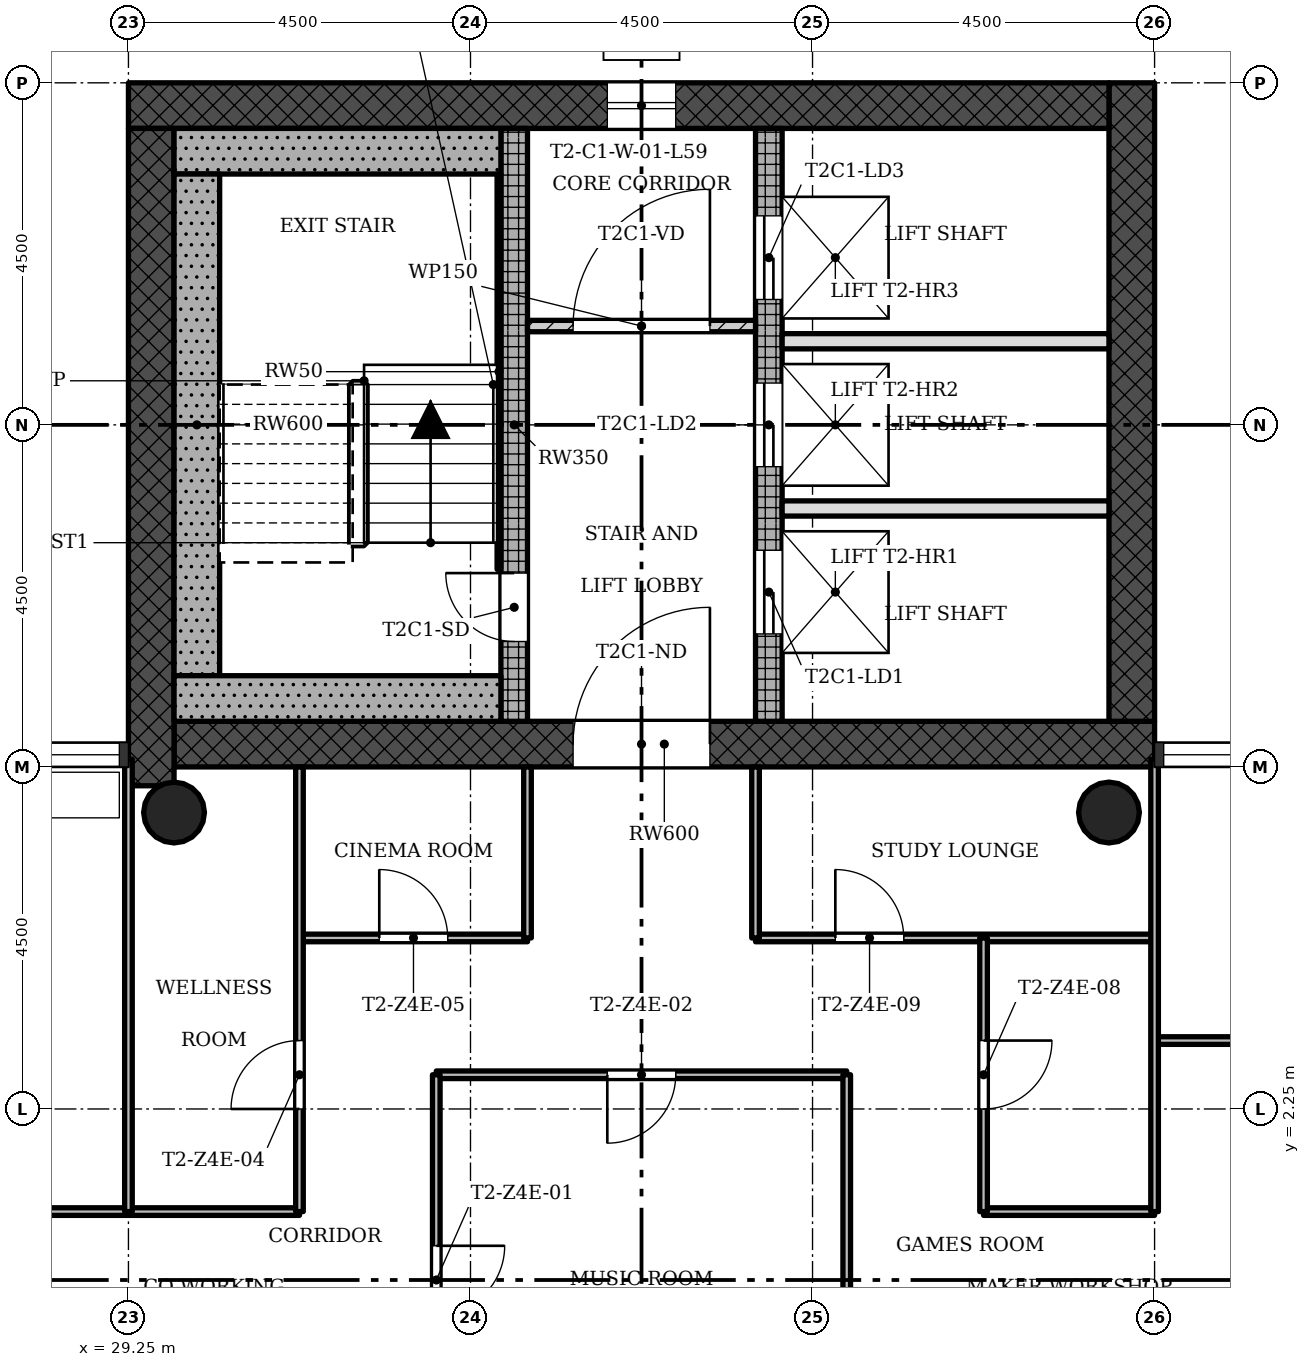
"""IFC4 building model, lengths in metres.
Left out: names, types, materials, properties, quantities, classifications, styles, units other than length and angle.
Written with IfcOpenShell. Run it as: python <this file> out.ifc"""

import sys

from ifc_helpers import new_model, si_unit, direction, frame, frame_2d, origin, origin_2d, place, context, subcontext, project, spatial, rectangle, hollow_circle, extrude, element, fill, save


model = new_model("IFC4")
c1 = context("Model", 3, precision=1e-05, world=origin(), true_north=direction((0.0, 1.0)))
c2 = subcontext(c1, "Body", "Model", "MODEL_VIEW")
j1 = project(units=[si_unit("LENGTHUNIT", "METRE"), si_unit("PLANEANGLEUNIT", "RADIAN")], contexts=[c1])
p1 = place(None, origin())
s1 = spatial("IfcSite", under=j1, at=p1, CompositionType="ELEMENT")
p2 = place(p1, origin())
s2 = spatial("IfcBuilding", under=s1, at=p2, CompositionType="ELEMENT")
p3 = place(p2, frame((0.0, 0.0, 213.0)))
s3 = spatial("IfcBuildingStorey", under=s2, at=p3, CompositionType="ELEMENT", Elevation=213.0)
p4 = place(p3, frame((29.85, 7.05, 0.0), z_axis=(0.0, 0.0, 1.0), x_axis=(1.0, 0.0, 0.0)))
e1 = element("IfcWall", 1, at=p4, inside=s3, PredefinedType="SHEAR", context=c2, shape_type="SweptSolid", body=[
    extrude(rectangle(XDim=12.9, YDim=0.6, at=frame_2d((6.45, 0.0))), origin(), (0.0, 0.0, 1.0), 3.4),
])
p5 = place(p4, frame((5.25, 0.0, 0.0)))
e2 = element("IfcOpeningElement", 2, at=p5, cuts=e1, PredefinedType="OPENING", context=c2, shape_type="SweptSolid", body=[
    extrude(rectangle(XDim=1.8, YDim=2.1, at=frame_2d((0.9, 1.05))), frame((0.0, 0.31, 0.0), z_axis=(0.0, -1.0, 0.0), x_axis=(1.0, 0.0, 0.0)), (0.0, 0.0, 1.0), 0.62),
])
p6 = place(p3, frame((42.45, 7.35, 0.0), z_axis=(0.0, 0.0, 1.0), x_axis=(0.0, 1.0, 0.0)))
e3 = element("IfcWall", 3, at=p6, inside=s3, PredefinedType="SHEAR", context=c2, shape_type="SweptSolid", body=[
    extrude(rectangle(XDim=8.4, YDim=0.6, at=frame_2d((4.2, 0.0))), origin(), (0.0, 0.0, 1.0), 3.4),
])
p7 = place(p3, frame((42.15, 15.45, 0.0), z_axis=(0.0, 0.0, 1.0), x_axis=(-1.0, 0.0, 0.0)))
e4 = element("IfcWall", 4, at=p7, inside=s3, PredefinedType="SHEAR", context=c2, shape_type="SweptSolid", body=[
    extrude(rectangle(XDim=12.9, YDim=0.6, at=frame_2d((6.45, 0.0))), origin(), (0.0, 0.0, 1.0), 3.4),
])
p8 = place(p7, frame((5.7, 0.0, 0.45)))
e5 = element("IfcOpeningElement", 5, at=p8, cuts=e4, PredefinedType="OPENING", context=c2, shape_type="SweptSolid", body=[
    extrude(rectangle(XDim=0.9, YDim=2.4, at=frame_2d((0.45, 1.2))), frame((0.0, 0.31, 0.0), z_axis=(0.0, -1.0, 0.0), x_axis=(1.0, 0.0, 0.0)), (0.0, 0.0, 1.0), 0.62),
])
p9 = place(p3, frame((29.55, 15.15, 0.0), z_axis=(0.0, 0.0, 1.0), x_axis=(0.0, -1.0, 0.0)))
e6 = element("IfcWall", 6, at=p9, inside=s3, PredefinedType="SHEAR", context=c2, shape_type="SweptSolid", body=[
    extrude(rectangle(XDim=8.648, YDim=0.6, at=frame_2d((4.324, 0.0))), origin(), (0.0, 0.0, 1.0), 3.4),
])
p10 = place(p3, frame((34.325, 7.35, 0.0), z_axis=(0.0, 0.0, 1.0), x_axis=(0.0, 1.0, 0.0)))
e7 = element("IfcWall", 7, at=p10, inside=s3, PredefinedType="SHEAR", context=c2, shape_type="SweptSolid", body=[
    extrude(rectangle(XDim=7.8, YDim=0.35, at=frame_2d((3.9, 0.0))), origin(), (0.0, 0.0, 1.0), 3.4),
])
p11 = place(p10, frame((1.05, 0.0, 0.0)))
e8 = element("IfcOpeningElement", 8, at=p11, cuts=e7, PredefinedType="OPENING", context=c2, shape_type="SweptSolid", body=[
    extrude(rectangle(XDim=0.9, YDim=2.1, at=frame_2d((0.45, 1.05))), frame((0.0, 0.185, 0.0), z_axis=(0.0, -1.0, 0.0), x_axis=(1.0, 0.0, 0.0)), (0.0, 0.0, 1.0), 0.37),
])
p12 = place(p3, frame((37.675, 7.35, 0.0), z_axis=(0.0, 0.0, 1.0), x_axis=(0.0, 1.0, 0.0)))
e9 = element("IfcWall", 9, at=p12, inside=s3, PredefinedType="SHEAR", context=c2, shape_type="SweptSolid", body=[
    extrude(rectangle(XDim=7.8, YDim=0.35, at=frame_2d((3.9, 0.0))), origin(), (0.0, 0.0, 1.0), 3.4),
])
p13 = place(p12, frame((1.15, 0.0, 0.0)))
e10 = element("IfcOpeningElement", 10, at=p13, cuts=e9, PredefinedType="OPENING", context=c2, shape_type="SweptSolid", body=[
    extrude(rectangle(XDim=1.1, YDim=2.1, at=frame_2d((0.55, 1.05))), frame((0.0, 0.185, 0.0), z_axis=(0.0, -1.0, 0.0), x_axis=(1.0, 0.0, 0.0)), (0.0, 0.0, 1.0), 0.37),
])
p14 = place(p12, frame((3.35, 0.0, 0.0)))
e11 = element("IfcOpeningElement", 11, at=p14, cuts=e9, PredefinedType="OPENING", context=c2, shape_type="SweptSolid", body=[
    extrude(rectangle(XDim=1.1, YDim=2.1, at=frame_2d((0.55, 1.05))), frame((0.0, 0.185, 0.0), z_axis=(0.0, -1.0, 0.0), x_axis=(1.0, 0.0, 0.0)), (0.0, 0.0, 1.0), 0.37),
])
p15 = place(p12, frame((5.55, 0.0, 0.0)))
e12 = element("IfcOpeningElement", 12, at=p15, cuts=e9, PredefinedType="OPENING", context=c2, shape_type="SweptSolid", body=[
    extrude(rectangle(XDim=1.1, YDim=2.1, at=frame_2d((0.55, 1.05))), frame((0.0, 0.185, 0.0), z_axis=(0.0, -1.0, 0.0), x_axis=(1.0, 0.0, 0.0)), (0.0, 0.0, 1.0), 0.37),
])
for number, where, z_axis, x_axis in (
    (13, (42.15, 6.15, 0.0), (0.0, 0.0, 1.0), (1.0, 0.0, 0.0)),
    (14, (29.85, 6.15, 0.0), (0.0, 0.0, 1.0), (1.0, 0.0, 0.0)),
):
    element("IfcColumn", number, at=place(p3, frame(where, z_axis=z_axis, x_axis=x_axis)), inside=s3, PredefinedType="COLUMN", context=c2, shape_type="SweptSolid", body=[
        extrude(hollow_circle(Radius=0.4, WallThickness=0.028, at=origin_2d()), origin(), (0.0, 0.0, 1.0), 3.4),
    ])
p16 = place(p3, frame((37.5, 12.55, 0.0), z_axis=(0.0, 0.0, 1.0), x_axis=(-1.0, 0.0, 0.0)))
e15 = element("IfcWall", 15, at=p16, inside=s3, PredefinedType="PARTITIONING", context=c2, shape_type="SweptSolid", body=[
    extrude(rectangle(XDim=3.0, YDim=0.15, at=frame_2d((1.5, 0.0))), origin(), (0.0, 0.0, 1.0), 3.0),
])
p17 = place(p16, frame((0.6, 0.0, 0.0)))
e16 = element("IfcOpeningElement", 16, at=p17, cuts=e15, PredefinedType="OPENING", context=c2, shape_type="SweptSolid", body=[
    extrude(rectangle(XDim=1.8, YDim=2.1, at=frame_2d((0.9, 1.05))), frame((0.0, 0.085, 0.0), z_axis=(0.0, -1.0, 0.0), x_axis=(1.0, 0.0, 0.0)), (0.0, 0.0, 1.0), 0.17),
])
for number, where, z_axis, x_axis in (
    (17, (42.15, 10.15, 0.0), (0.0, 0.0, 1.0), (-1.0, 0.0, 0.0)),
    (18, (42.15, 12.35, 0.0), (0.0, 0.0, 1.0), (-1.0, 0.0, 0.0)),
):
    element("IfcWall", number, at=place(p3, frame(where, z_axis=z_axis, x_axis=x_axis)), inside=s3, PredefinedType="SOLIDWALL", context=c2, shape_type="SweptSolid", body=[
        extrude(rectangle(XDim=4.3, YDim=0.2, at=frame_2d((2.15, 0.0))), origin(), (0.0, 0.0, 1.0), 3.0),
    ])
p18 = place(p3, frame((42.75, 0.9, 0.0), z_axis=(0.0, 0.0, 1.0), x_axis=(-1.0, 0.0, 0.0)))
e19 = element("IfcWall", 19, at=p18, inside=s3, PredefinedType="PARTITIONING", context=c2, shape_type="SweptSolid", body=[
    extrude(rectangle(XDim=2.25, YDim=0.1, at=frame_2d((1.125, 0.0))), origin(), (0.0, 0.0, 1.0), 3.0),
])
p19 = place(p3, frame((31.5, 0.9, 0.0), z_axis=(0.0, 0.0, 1.0), x_axis=(-1.0, 0.0, 0.0)))
e20 = element("IfcWall", 20, at=p19, inside=s3, PredefinedType="PARTITIONING", context=c2, shape_type="SweptSolid", body=[
    extrude(rectangle(XDim=6.75, YDim=0.1, at=frame_2d((3.375, 0.0))), origin(), (0.0, 0.0, 1.0), 3.0),
])
p20 = place(p19, frame((4.05, 0.0, 0.0)))
e21 = element("IfcOpeningElement", 21, at=p20, cuts=e20, PredefinedType="OPENING", context=c2, shape_type="SweptSolid", body=[
    extrude(rectangle(XDim=0.9, YDim=2.1, at=frame_2d((0.45, 1.05))), frame((0.0, 0.06, 0.0), z_axis=(0.0, -1.0, 0.0), x_axis=(1.0, 0.0, 0.0)), (0.0, 0.0, 1.0), 0.12),
])
p21 = place(p3, frame((38.7, 2.7, 0.0), z_axis=(0.0, 0.0, 1.0), x_axis=(-1.0, 0.0, 0.0)))
e22 = element("IfcWall", 22, at=p21, inside=s3, PredefinedType="PARTITIONING", context=c2, shape_type="SweptSolid", body=[
    extrude(rectangle(XDim=5.4, YDim=0.1, at=frame_2d((2.7, 0.0))), origin(), (0.0, 0.0, 1.0), 3.0),
])
p22 = place(p21, frame((2.25, 0.0, 0.0)))
e23 = element("IfcOpeningElement", 23, at=p22, cuts=e22, PredefinedType="OPENING", context=c2, shape_type="SweptSolid", body=[
    extrude(rectangle(XDim=0.9, YDim=2.1, at=frame_2d((0.45, 1.05))), frame((0.0, 0.06, 0.0), z_axis=(0.0, -1.0, 0.0), x_axis=(1.0, 0.0, 0.0)), (0.0, 0.0, 1.0), 0.12),
])
p23 = place(p3, frame((47.25, 3.15, 0.0), z_axis=(0.0, 0.0, 1.0), x_axis=(-1.0, 0.0, 0.0)))
e24 = element("IfcWall", 24, at=p23, inside=s3, PredefinedType="PARTITIONING", context=c2, shape_type="SweptSolid", body=[
    extrude(rectangle(XDim=4.5, YDim=0.1, at=frame_2d((2.25, 0.0))), origin(), (0.0, 0.0, 1.0), 3.0),
])
p24 = place(p23, frame((1.8, 0.0, 0.0)))
e25 = element("IfcOpeningElement", 25, at=p24, cuts=e24, PredefinedType="OPENING", context=c2, shape_type="SweptSolid", body=[
    extrude(rectangle(XDim=0.9, YDim=2.1, at=frame_2d((0.45, 1.05))), frame((0.0, 0.06, 0.0), z_axis=(0.0, -1.0, 0.0), x_axis=(1.0, 0.0, 0.0)), (0.0, 0.0, 1.0), 0.12),
])
p25 = place(p3, frame((42.75, 4.5, 0.0), z_axis=(0.0, 0.0, 1.0), x_axis=(-1.0, 0.0, 0.0)))
e26 = element("IfcWall", 26, at=p25, inside=s3, PredefinedType="PARTITIONING", context=c2, shape_type="SweptSolid", body=[
    extrude(rectangle(XDim=5.25, YDim=0.1, at=frame_2d((2.625, 0.0))), origin(), (0.0, 0.0, 1.0), 3.0),
])
p26 = place(p25, frame((3.3, 0.0, 0.0)))
e27 = element("IfcOpeningElement", 27, at=p26, cuts=e26, PredefinedType="OPENING", context=c2, shape_type="SweptSolid", body=[
    extrude(rectangle(XDim=0.9, YDim=2.1, at=frame_2d((0.45, 1.05))), frame((0.0, 0.06, 0.0), z_axis=(0.0, -1.0, 0.0), x_axis=(1.0, 0.0, 0.0)), (0.0, 0.0, 1.0), 0.12),
])
p27 = place(p3, frame((34.5, 4.5, 0.0), z_axis=(0.0, 0.0, 1.0), x_axis=(-1.0, 0.0, 0.0)))
e28 = element("IfcWall", 28, at=p27, inside=s3, PredefinedType="PARTITIONING", context=c2, shape_type="SweptSolid", body=[
    extrude(rectangle(XDim=3.0, YDim=0.1, at=frame_2d((1.5, 0.0))), origin(), (0.0, 0.0, 1.0), 3.0),
])
p28 = place(p27, frame((1.05, 0.0, 0.0)))
e29 = element("IfcOpeningElement", 29, at=p28, cuts=e28, PredefinedType="OPENING", context=c2, shape_type="SweptSolid", body=[
    extrude(rectangle(XDim=0.9, YDim=2.1, at=frame_2d((0.45, 1.05))), frame((0.0, 0.06, 0.0), z_axis=(0.0, -1.0, 0.0), x_axis=(1.0, 0.0, 0.0)), (0.0, 0.0, 1.0), 0.12),
])
p29 = place(p3, frame((42.75, 0.9, 0.0), z_axis=(0.0, 0.0, 1.0), x_axis=(0.0, 1.0, 0.0)))
e30 = element("IfcWall", 30, at=p29, inside=s3, PredefinedType="PARTITIONING", context=c2, shape_type="SweptSolid", body=[
    extrude(rectangle(XDim=5.95, YDim=0.1, at=frame_2d((2.975, 0.0))), origin(), (0.0, 0.0, 1.0), 3.0),
])
p30 = place(p3, frame((40.5, 0.9, 0.0), z_axis=(0.0, 0.0, 1.0), x_axis=(0.0, 1.0, 0.0)))
e31 = element("IfcWall", 31, at=p30, inside=s3, PredefinedType="PARTITIONING", context=c2, shape_type="SweptSolid", body=[
    extrude(rectangle(XDim=3.6, YDim=0.1, at=frame_2d((1.8, 0.0))), origin(), (0.0, 0.0, 1.0), 3.0),
])
p31 = place(p30, frame((1.35, 0.0, 0.0)))
e32 = element("IfcOpeningElement", 32, at=p31, cuts=e31, PredefinedType="OPENING", context=c2, shape_type="SweptSolid", body=[
    extrude(rectangle(XDim=0.9, YDim=2.1, at=frame_2d((0.45, 1.05))), frame((0.0, 0.06, 0.0), z_axis=(0.0, -1.0, 0.0), x_axis=(1.0, 0.0, 0.0)), (0.0, 0.0, 1.0), 0.12),
])
p32 = place(p3, frame((38.7, -2.7, 0.0), z_axis=(0.0, 0.0, 1.0), x_axis=(0.0, 1.0, 0.0)))
e33 = element("IfcWall", 33, at=p32, inside=s3, PredefinedType="PARTITIONING", context=c2, shape_type="SweptSolid", body=[
    extrude(rectangle(XDim=5.4, YDim=0.1, at=frame_2d((2.7, 0.0))), origin(), (0.0, 0.0, 1.0), 3.0),
])
for number, where, z_axis, x_axis in (
    (34, (37.5, 4.5, 0.0), (0.0, 0.0, 1.0), (0.0, 1.0, 0.0)),
    (35, (34.5, 4.5, 0.0), (0.0, 0.0, 1.0), (0.0, 1.0, 0.0)),
):
    element("IfcWall", number, at=place(p3, frame(where, z_axis=z_axis, x_axis=x_axis)), inside=s3, PredefinedType="PARTITIONING", context=c2, shape_type="SweptSolid", body=[
        extrude(rectangle(XDim=2.25, YDim=0.1, at=frame_2d((1.125, 0.0))), origin(), (0.0, 0.0, 1.0), 3.0),
    ])
p33 = place(p3, frame((33.3, -2.7, 0.0), z_axis=(0.0, 0.0, 1.0), x_axis=(0.0, 1.0, 0.0)))
e36 = element("IfcWall", 36, at=p33, inside=s3, PredefinedType="PARTITIONING", context=c2, shape_type="SweptSolid", body=[
    extrude(rectangle(XDim=5.4, YDim=0.1, at=frame_2d((2.7, 0.0))), origin(), (0.0, 0.0, 1.0), 3.0),
])
p34 = place(p33, frame((2.25, 0.0, 0.0)))
e37 = element("IfcOpeningElement", 37, at=p34, cuts=e36, PredefinedType="OPENING", context=c2, shape_type="SweptSolid", body=[
    extrude(rectangle(XDim=0.9, YDim=2.1, at=frame_2d((0.45, 1.05))), frame((0.0, 0.06, 0.0), z_axis=(0.0, -1.0, 0.0), x_axis=(1.0, 0.0, 0.0)), (0.0, 0.0, 1.0), 0.12),
])
p35 = place(p3, frame((31.5, 0.9, 0.0), z_axis=(0.0, 0.0, 1.0), x_axis=(0.0, 1.0, 0.0)))
e38 = element("IfcWall", 38, at=p35, inside=s3, PredefinedType="PARTITIONING", context=c2, shape_type="SweptSolid", body=[
    extrude(rectangle(XDim=5.85, YDim=0.1, at=frame_2d((2.925, 0.0))), origin(), (0.0, 0.0, 1.0), 3.0),
])
p36 = place(p35, frame((1.35, 0.0, 0.0)))
e39 = element("IfcOpeningElement", 39, at=p36, cuts=e38, PredefinedType="OPENING", context=c2, shape_type="SweptSolid", body=[
    extrude(rectangle(XDim=0.9, YDim=2.1, at=frame_2d((0.45, 1.05))), frame((0.0, 0.06, 0.0), z_axis=(0.0, -1.0, 0.0), x_axis=(1.0, 0.0, 0.0)), (0.0, 0.0, 1.0), 0.12),
])
p37 = place(p3, frame((29.25, 0.9, 0.0), z_axis=(0.0, 0.0, 1.0), x_axis=(0.0, 1.0, 0.0)))
e40 = element("IfcWall", 40, at=p37, inside=s3, PredefinedType="PARTITIONING", context=c2, shape_type="SweptSolid", body=[
    extrude(rectangle(XDim=5.95, YDim=0.1, at=frame_2d((2.975, 0.0))), origin(), (0.0, 0.0, 1.0), 3.0),
])
p38 = place(p3, frame((34.15, 14.85, 0.0), z_axis=(0.0, 0.0, 1.0), x_axis=(-1.0, 0.0, 0.0)))
e41 = element("IfcWall", 41, at=p38, inside=s3, PredefinedType="SHEAR", context=c2, shape_type="SweptSolid", body=[
    extrude(rectangle(XDim=4.3, YDim=0.6, at=frame_2d((2.15, 0.0))), origin(), (0.0, 0.0, 1.0), 3.4),
])
p39 = place(p3, frame((30.15, 7.95, 0.0), z_axis=(0.0, 0.0, 1.0), x_axis=(0.0, 1.0, 0.0)))
e42 = element("IfcWall", 42, at=p39, inside=s3, PredefinedType="SHEAR", context=c2, shape_type="SweptSolid", body=[
    extrude(rectangle(XDim=6.6, YDim=0.6, at=frame_2d((3.3, 0.0))), origin(), (0.0, 0.0, 1.0), 3.4),
])
p40 = place(p3, frame((34.15, 7.65, 0.0), z_axis=(0.0, 0.0, 1.0), x_axis=(-1.0, 0.0, 0.0)))
e43 = element("IfcWall", 43, at=p40, inside=s3, PredefinedType="SHEAR", context=c2, shape_type="SweptSolid", body=[
    extrude(rectangle(XDim=4.3, YDim=0.6, at=frame_2d((2.15, 0.0))), origin(), (0.0, 0.0, 1.0), 3.4),
])
p41 = place(p3, frame((34.125, 9.35, 0.0), z_axis=(0.0, 0.0, 1.0), x_axis=(0.0, 1.0, 0.0)))
e44 = element("IfcWall", 44, at=p41, inside=s3, PredefinedType="SHEAR", context=c2, shape_type="SweptSolid", body=[
    extrude(rectangle(XDim=5.2, YDim=0.05, at=frame_2d((2.6, 0.0))), origin(), (0.0, 0.0, 1.0), 3.4),
])
p42 = place(p8, origin())
e45 = element("IfcWindow", 45, at=p42, inside=s3, PartitioningType="SINGLE_PANEL", PredefinedType="WINDOW", context=c2, shape_type="SweptSolid", body=[
    extrude(rectangle(XDim=0.9, YDim=2.4, at=frame_2d((0.45, 1.2))), frame((0.0, 0.03, 0.0), z_axis=(0.0, -1.0, 0.0), x_axis=(1.0, 0.0, 0.0)), (0.0, 0.0, 1.0), 0.06),
])
fill(e5, e45)
p43 = place(p17, origin())
e46 = element("IfcDoor", 46, at=p43, inside=s3, OperationType="SINGLE_SWING_LEFT", PredefinedType="DOOR", context=c2, shape_type="SweptSolid", body=[
    extrude(rectangle(XDim=1.8, YDim=2.1, at=frame_2d((0.9, 1.05))), frame((0.0, 0.025, 0.0), z_axis=(0.0, -1.0, 0.0), x_axis=(1.0, 0.0, 0.0)), (0.0, 0.0, 1.0), 0.05),
])
fill(e16, e46)
p44 = place(p34, origin())
e47 = element("IfcDoor", 47, at=p44, inside=s3, OperationType="SINGLE_SWING_RIGHT", PredefinedType="DOOR", context=c2, shape_type="SweptSolid", body=[
    extrude(rectangle(XDim=0.9, YDim=2.1, at=frame_2d((0.45, 1.05))), frame((0.0, 0.025, 0.0), z_axis=(0.0, -1.0, 0.0), x_axis=(1.0, 0.0, 0.0)), (0.0, 0.0, 1.0), 0.05),
])
fill(e37, e47)
p45 = place(p22, origin())
e48 = element("IfcDoor", 48, at=p45, inside=s3, OperationType="SINGLE_SWING_LEFT", PredefinedType="DOOR", context=c2, shape_type="SweptSolid", body=[
    extrude(rectangle(XDim=0.9, YDim=2.1, at=frame_2d((0.45, 1.05))), frame((0.0, 0.025, 0.0), z_axis=(0.0, -1.0, 0.0), x_axis=(1.0, 0.0, 0.0)), (0.0, 0.0, 1.0), 0.05),
])
fill(e23, e48)
p46 = place(p36, origin())
e49 = element("IfcDoor", 49, at=p46, inside=s3, OperationType="SINGLE_SWING_RIGHT", PredefinedType="DOOR", context=c2, shape_type="SweptSolid", body=[
    extrude(rectangle(XDim=0.9, YDim=2.1, at=frame_2d((0.45, 1.05))), frame((0.0, 0.025, 0.0), z_axis=(0.0, -1.0, 0.0), x_axis=(1.0, 0.0, 0.0)), (0.0, 0.0, 1.0), 0.05),
])
fill(e39, e49)
p47 = place(p28, origin())
e50 = element("IfcDoor", 50, at=p47, inside=s3, OperationType="SINGLE_SWING_RIGHT", PredefinedType="DOOR", context=c2, shape_type="SweptSolid", body=[
    extrude(rectangle(XDim=0.9, YDim=2.1, at=frame_2d((0.45, 1.05))), frame((0.0, 0.025, 0.0), z_axis=(0.0, -1.0, 0.0), x_axis=(1.0, 0.0, 0.0)), (0.0, 0.0, 1.0), 0.05),
])
fill(e29, e50)
p48 = place(p31, origin())
e51 = element("IfcDoor", 51, at=p48, inside=s3, OperationType="SINGLE_SWING_RIGHT", PredefinedType="DOOR", context=c2, shape_type="SweptSolid", body=[
    extrude(rectangle(XDim=0.9, YDim=2.1, at=frame_2d((0.45, 1.05))), frame((0.0, 0.025, 0.0), z_axis=(0.0, -1.0, 0.0), x_axis=(1.0, 0.0, 0.0)), (0.0, 0.0, 1.0), 0.05),
])
fill(e32, e51)
p49 = place(p26, origin())
e52 = element("IfcDoor", 52, at=p49, inside=s3, OperationType="SINGLE_SWING_RIGHT", PredefinedType="DOOR", context=c2, shape_type="SweptSolid", body=[
    extrude(rectangle(XDim=0.9, YDim=2.1, at=frame_2d((0.45, 1.05))), frame((0.0, 0.025, 0.0), z_axis=(0.0, -1.0, 0.0), x_axis=(1.0, 0.0, 0.0)), (0.0, 0.0, 1.0), 0.05),
])
fill(e27, e52)
p50 = place(p11, origin())
e53 = element("IfcDoor", 53, at=p50, inside=s3, OperationType="SINGLE_SWING_LEFT", PredefinedType="DOOR", context=c2, shape_type="SweptSolid", body=[
    extrude(rectangle(XDim=0.9, YDim=2.1, at=frame_2d((0.45, 1.05))), frame((0.0, 0.025, 0.0), z_axis=(0.0, -1.0, 0.0), x_axis=(1.0, 0.0, 0.0)), (0.0, 0.0, 1.0), 0.05),
])
fill(e8, e53)
p51 = place(p13, origin())
e54 = element("IfcDoor", 54, at=p51, inside=s3, OperationType="SLIDING_TO_LEFT", PredefinedType="DOOR", context=c2, shape_type="SweptSolid", body=[
    extrude(rectangle(XDim=1.1, YDim=2.1, at=frame_2d((0.55, 1.05))), frame((0.0, 0.025, 0.0), z_axis=(0.0, -1.0, 0.0), x_axis=(1.0, 0.0, 0.0)), (0.0, 0.0, 1.0), 0.05),
])
fill(e10, e54)
p52 = place(p14, origin())
e55 = element("IfcDoor", 55, at=p52, inside=s3, OperationType="SLIDING_TO_LEFT", PredefinedType="DOOR", context=c2, shape_type="SweptSolid", body=[
    extrude(rectangle(XDim=1.1, YDim=2.1, at=frame_2d((0.55, 1.05))), frame((0.0, 0.025, 0.0), z_axis=(0.0, -1.0, 0.0), x_axis=(1.0, 0.0, 0.0)), (0.0, 0.0, 1.0), 0.05),
])
fill(e11, e55)
p53 = place(p15, origin())
e56 = element("IfcDoor", 56, at=p53, inside=s3, OperationType="SLIDING_TO_LEFT", PredefinedType="DOOR", context=c2, shape_type="SweptSolid", body=[
    extrude(rectangle(XDim=1.1, YDim=2.1, at=frame_2d((0.55, 1.05))), frame((0.0, 0.025, 0.0), z_axis=(0.0, -1.0, 0.0), x_axis=(1.0, 0.0, 0.0)), (0.0, 0.0, 1.0), 0.05),
])
fill(e12, e56)
p54 = place(p5, origin())
e57 = element("IfcDoor", 57, at=p54, inside=s3, OperationType="SINGLE_SWING_LEFT", PredefinedType="DOOR", context=c2, shape_type="SweptSolid", body=[
    extrude(rectangle(XDim=1.8, YDim=2.1, at=frame_2d((0.9, 1.05))), frame((0.0, 0.025, 0.0), z_axis=(0.0, -1.0, 0.0), x_axis=(1.0, 0.0, 0.0)), (0.0, 0.0, 1.0), 0.05),
])
fill(e2, e57)
save(model, sys.argv[1])
